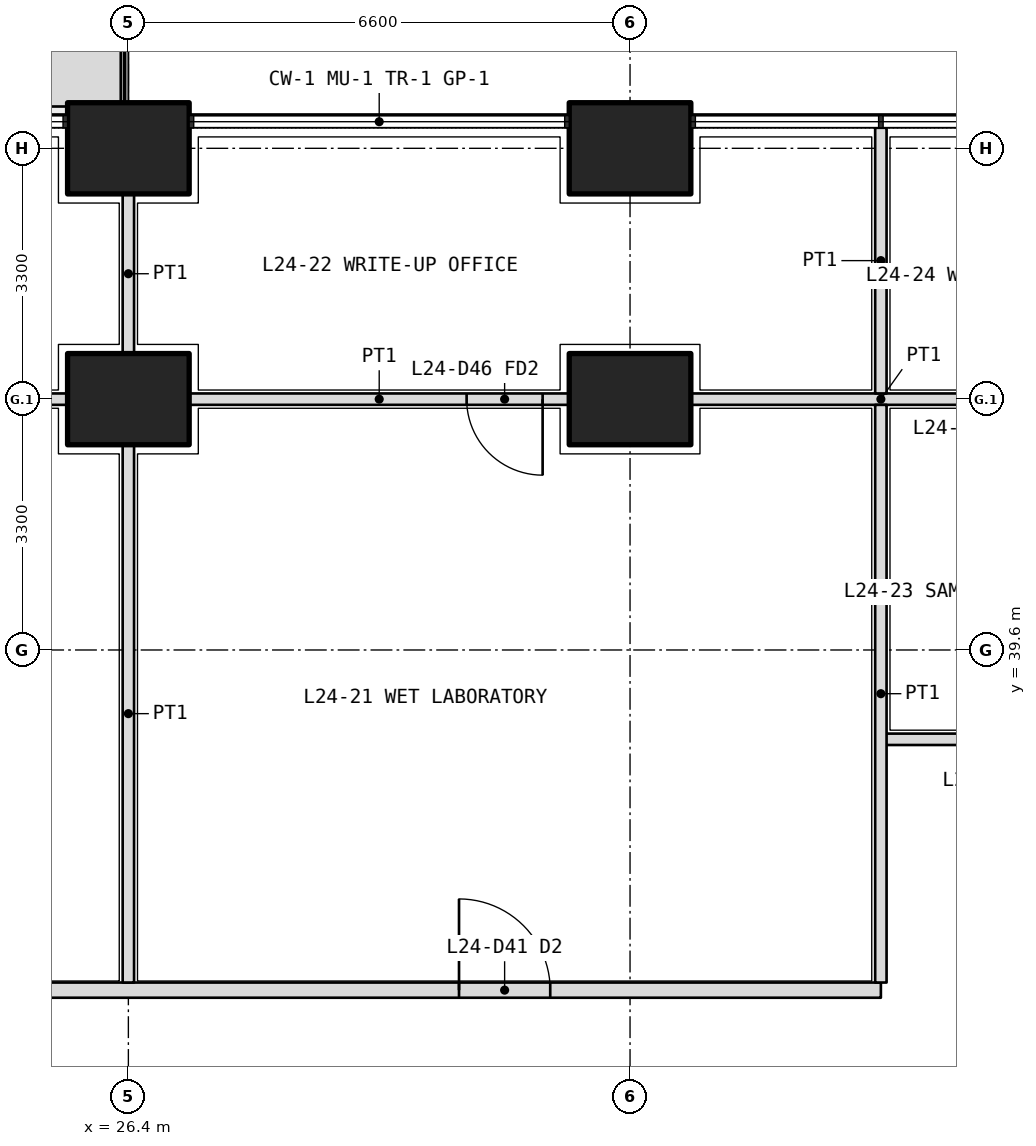
"""IFC4 building model, lengths in metres.
Left out: names, types, materials, properties, quantities, classifications, styles, units other than length and angle.
Written with IfcOpenShell. Run it as: python <this file> out.ifc"""

import sys

from ifc_helpers import new_model, si_unit, direction, frame, frame_2d, origin, origin_2d, place, context, subcontext, project, spatial, polyline, rectangle, outline, extrude, element, fill, save


model = new_model("IFC4")
c1 = context("Model", 3, precision=1e-05, world=origin(), true_north=direction((0.0, 1.0)))
c2 = subcontext(c1, "Body", "Model", "MODEL_VIEW")
j1 = project(units=[si_unit("LENGTHUNIT", "METRE"), si_unit("PLANEANGLEUNIT", "RADIAN")], contexts=[c1])
p1 = place(None, origin())
s1 = spatial("IfcSite", under=j1, at=p1, CompositionType="ELEMENT")
p2 = place(p1, origin())
s2 = spatial("IfcBuilding", under=s1, at=p2, CompositionType="ELEMENT")
p3 = place(p2, frame((0.0, 0.0, 107.4)))
s3 = spatial("IfcBuildingStorey", under=s2, at=p3, CompositionType="ELEMENT", Elevation=107.4)
for number, where, z_axis, x_axis in (
    (1, (26.4, 46.2, 0.0), (0.0, 0.0, 1.0), (1.0, 0.0, 0.0)),
    (2, (33.0, 46.2, 0.0), (0.0, 0.0, 1.0), (1.0, 0.0, 0.0)),
    (3, (26.4, 42.9, 0.0), (0.0, 0.0, 1.0), (1.0, 0.0, 0.0)),
    (4, (33.0, 42.9, 0.0), (0.0, 0.0, 1.0), (1.0, 0.0, 0.0)),
):
    element("IfcColumn", number, at=place(p3, frame(where, z_axis=z_axis, x_axis=x_axis)), inside=s3, PredefinedType="COLUMN", context=c2, shape_type="SweptSolid", body=[
        extrude(rectangle(XDim=1.6, YDim=1.2, at=origin_2d()), origin(), (0.0, 0.0, 1.0), 4.2),
    ])
p4 = place(p3, origin())
e5 = element("IfcWall", 5, at=p4, inside=s3, PredefinedType="USERDEFINED", context=c2, shape_type="SweptSolid", body=[
    extrude(outline(polyline([(17.25, 46.75), (26.3, 46.75), (26.3, 47.75), (17.25, 47.75), (17.25, 46.75)]), holes=[polyline([(17.4, 46.9), (26.15, 46.9), (26.15, 47.6), (17.4, 47.6), (17.4, 46.9)])]), origin(), (0.0, 0.0, 1.0), 1.05),
])
p5 = place(p3, frame((10.975, 35.125, 0.0), z_axis=(0.0, 0.0, 1.0), x_axis=(1.0, 0.0, 0.0)))
e6 = element("IfcWall", 6, at=p5, inside=s3, PredefinedType="PARTITIONING", context=c2, shape_type="SweptSolid", body=[
    extrude(rectangle(XDim=25.325, YDim=0.2, at=frame_2d((12.663, 0.0))), origin(), (0.0, 0.0, 1.0), 2.85),
])
p6 = place(p5, frame((0.663, 0.0, 0.0)))
e7 = element("IfcOpeningElement", 7, at=p6, cuts=e6, PredefinedType="OPENING", context=c2, shape_type="SweptSolid", body=[
    extrude(rectangle(XDim=1.0, YDim=2.1, at=frame_2d((0.5, 1.05))), frame((0.0, 0.11, 0.0), z_axis=(0.0, -1.0, 0.0), x_axis=(1.0, 0.0, 0.0)), (0.0, 0.0, 1.0), 0.22),
])
p7 = place(p5, frame((3.425, 0.0, 0.0)))
e8 = element("IfcOpeningElement", 8, at=p7, cuts=e6, PredefinedType="OPENING", context=c2, shape_type="SweptSolid", body=[
    extrude(rectangle(XDim=1.0, YDim=2.1, at=frame_2d((0.5, 1.05))), frame((0.0, 0.11, 0.0), z_axis=(0.0, -1.0, 0.0), x_axis=(1.0, 0.0, 0.0)), (0.0, 0.0, 1.0), 0.22),
])
p8 = place(p5, frame((6.725, 0.0, 0.0)))
e9 = element("IfcOpeningElement", 9, at=p8, cuts=e6, PredefinedType="OPENING", context=c2, shape_type="SweptSolid", body=[
    extrude(rectangle(XDim=1.0, YDim=2.1, at=frame_2d((0.5, 1.05))), frame((0.0, 0.11, 0.0), z_axis=(0.0, -1.0, 0.0), x_axis=(1.0, 0.0, 0.0)), (0.0, 0.0, 1.0), 0.22),
])
p9 = place(p5, frame((11.525, 0.0, 0.0)))
e10 = element("IfcOpeningElement", 10, at=p9, cuts=e6, PredefinedType="OPENING", context=c2, shape_type="SweptSolid", body=[
    extrude(rectangle(XDim=1.2, YDim=2.1, at=frame_2d((0.6, 1.05))), frame((0.0, 0.11, 0.0), z_axis=(0.0, -1.0, 0.0), x_axis=(1.0, 0.0, 0.0)), (0.0, 0.0, 1.0), 0.22),
])
p10 = place(p5, frame((19.775, 0.0, 0.0)))
e11 = element("IfcOpeningElement", 11, at=p10, cuts=e6, PredefinedType="OPENING", context=c2, shape_type="SweptSolid", body=[
    extrude(rectangle(XDim=1.2, YDim=2.1, at=frame_2d((0.6, 1.05))), frame((0.0, 0.11, 0.0), z_axis=(0.0, -1.0, 0.0), x_axis=(1.0, 0.0, 0.0)), (0.0, 0.0, 1.0), 0.22),
])
p11 = place(p3, frame((38.8, 42.9, 0.0), z_axis=(0.0, 0.0, 1.0), x_axis=(-1.0, 0.0, 0.0)))
e12 = element("IfcWall", 12, at=p11, inside=s3, PredefinedType="PARTITIONING", context=c2, shape_type="SweptSolid", body=[
    extrude(rectangle(XDim=5.0, YDim=0.15, at=frame_2d((2.5, 0.0))), origin(), (0.0, 0.0, 1.0), 3.9),
])
p12 = place(p11, frame((0.35, 0.0, 0.0)))
e13 = element("IfcOpeningElement", 13, at=p12, cuts=e12, PredefinedType="OPENING", context=c2, shape_type="SweptSolid", body=[
    extrude(rectangle(XDim=1.0, YDim=2.1, at=frame_2d((0.5, 1.05))), frame((0.0, 0.085, 0.0), z_axis=(0.0, -1.0, 0.0), x_axis=(1.0, 0.0, 0.0)), (0.0, 0.0, 1.0), 0.17),
])
p13 = place(p3, frame((32.2, 42.9, 0.0), z_axis=(0.0, 0.0, 1.0), x_axis=(-1.0, 0.0, 0.0)))
e14 = element("IfcWall", 14, at=p13, inside=s3, PredefinedType="PARTITIONING", context=c2, shape_type="SweptSolid", body=[
    extrude(rectangle(XDim=5.0, YDim=0.15, at=frame_2d((2.5, 0.0))), origin(), (0.0, 0.0, 1.0), 3.9),
])
p14 = place(p13, frame((0.35, 0.0, 0.0)))
e15 = element("IfcOpeningElement", 15, at=p14, cuts=e14, PredefinedType="OPENING", context=c2, shape_type="SweptSolid", body=[
    extrude(rectangle(XDim=1.0, YDim=2.1, at=frame_2d((0.5, 1.05))), frame((0.0, 0.085, 0.0), z_axis=(0.0, -1.0, 0.0), x_axis=(1.0, 0.0, 0.0)), (0.0, 0.0, 1.0), 0.17),
])
p15 = place(p3, frame((25.6, 42.9, 0.0), z_axis=(0.0, 0.0, 1.0), x_axis=(-1.0, 0.0, 0.0)))
e16 = element("IfcWall", 16, at=p15, inside=s3, PredefinedType="PARTITIONING", context=c2, shape_type="SweptSolid", body=[
    extrude(rectangle(XDim=5.0, YDim=0.15, at=frame_2d((2.5, 0.0))), origin(), (0.0, 0.0, 1.0), 3.9),
])
p16 = place(p15, frame((2.0, 0.0, 0.0)))
e17 = element("IfcOpeningElement", 17, at=p16, cuts=e16, PredefinedType="OPENING", context=c2, shape_type="SweptSolid", body=[
    extrude(rectangle(XDim=1.0, YDim=2.1, at=frame_2d((0.5, 1.05))), frame((0.0, 0.085, 0.0), z_axis=(0.0, -1.0, 0.0), x_axis=(1.0, 0.0, 0.0)), (0.0, 0.0, 1.0), 0.17),
])
p17 = place(p3, frame((36.3, 38.425, 0.0), z_axis=(0.0, 0.0, 1.0), x_axis=(1.0, 0.0, 0.0)))
e18 = element("IfcWall", 18, at=p17, inside=s3, PredefinedType="PARTITIONING", context=c2, shape_type="SweptSolid", body=[
    extrude(rectangle(XDim=3.3, YDim=0.15, at=frame_2d((1.65, 0.0))), origin(), (0.0, 0.0, 1.0), 2.85),
])
p18 = place(p17, frame((1.15, 0.0, 0.0)))
e19 = element("IfcOpeningElement", 19, at=p18, cuts=e18, PredefinedType="OPENING", context=c2, shape_type="SweptSolid", body=[
    extrude(rectangle(XDim=1.0, YDim=2.1, at=frame_2d((0.5, 1.05))), frame((0.0, 0.085, 0.0), z_axis=(0.0, -1.0, 0.0), x_axis=(1.0, 0.0, 0.0)), (0.0, 0.0, 1.0), 0.17),
])
p19 = place(p3, frame((26.4, 45.6, 0.0), z_axis=(0.0, 0.0, 1.0), x_axis=(0.0, -1.0, 0.0)))
e20 = element("IfcWall", 20, at=p19, inside=s3, PredefinedType="PARTITIONING", context=c2, shape_type="SweptSolid", body=[
    extrude(rectangle(XDim=2.1, YDim=0.15, at=frame_2d((1.05, 0.0))), origin(), (0.0, 0.0, 1.0), 2.85),
])
p20 = place(p3, frame((26.4, 42.3, 0.0), z_axis=(0.0, 0.0, 1.0), x_axis=(0.0, -1.0, 0.0)))
e21 = element("IfcWall", 21, at=p20, inside=s3, PredefinedType="PARTITIONING", context=c2, shape_type="SweptSolid", body=[
    extrude(rectangle(XDim=7.075, YDim=0.15, at=frame_2d((3.538, 0.0))), origin(), (0.0, 0.0, 1.0), 2.85),
])
p21 = place(p3, frame((36.3, 46.47, 0.0), z_axis=(0.0, 0.0, 1.0), x_axis=(0.0, -1.0, 0.0)))
e22 = element("IfcWall", 22, at=p21, inside=s3, PredefinedType="PARTITIONING", context=c2, shape_type="SweptSolid", body=[
    extrude(rectangle(XDim=3.495, YDim=0.15, at=frame_2d((1.748, 0.0))), origin(), (0.0, 0.0, 1.0), 2.7),
])
p22 = place(p3, frame((36.3, 42.825, 0.0), z_axis=(0.0, 0.0, 1.0), x_axis=(0.0, -1.0, 0.0)))
e23 = element("IfcWall", 23, at=p22, inside=s3, PredefinedType="PARTITIONING", context=c2, shape_type="SweptSolid", body=[
    extrude(rectangle(XDim=7.6, YDim=0.15, at=frame_2d((3.8, 0.0))), origin(), (0.0, 0.0, 1.0), 3.9),
])
p23 = place(p10, origin())
e24 = element("IfcDoor", 24, at=p23, inside=s3, OperationType="DOUBLE_DOOR_SINGLE_SWING", PredefinedType="DOOR", context=c2, shape_type="SweptSolid", body=[
    extrude(rectangle(XDim=1.2, YDim=2.1, at=frame_2d((0.6, 1.05))), frame((0.0, 0.025, 0.0), z_axis=(0.0, -1.0, 0.0), x_axis=(1.0, 0.0, 0.0)), (0.0, 0.0, 1.0), 0.05),
])
fill(e11, e24)
p24 = place(p14, origin())
e25 = element("IfcDoor", 25, at=p24, inside=s3, OperationType="SINGLE_SWING_LEFT", PredefinedType="DOOR", context=c2, shape_type="SweptSolid", body=[
    extrude(rectangle(XDim=1.0, YDim=2.1, at=frame_2d((0.5, 1.05))), frame((0.0, 0.025, 0.0), z_axis=(0.0, -1.0, 0.0), x_axis=(1.0, 0.0, 0.0)), (0.0, 0.0, 1.0), 0.05),
])
fill(e15, e25)
save(model, sys.argv[1])
